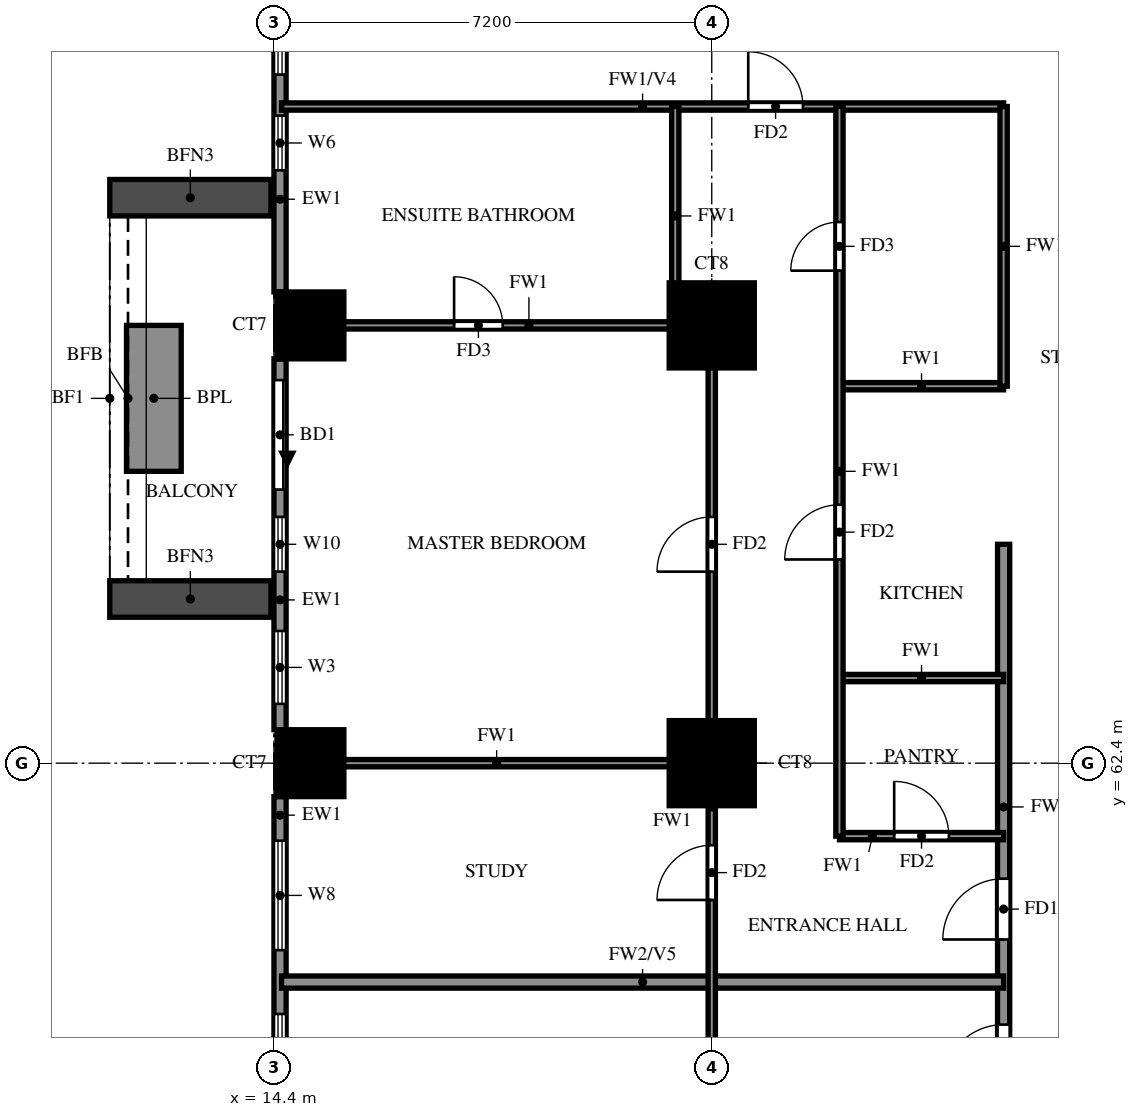
"""IFC4 building model, lengths in metres.
Left out: names, types, materials, properties, quantities, classifications, styles, units other than length and angle.
Written with IfcOpenShell. Run it as: python <this file> out.ifc"""

import sys

from ifc_helpers import new_model, si_unit, direction, frame, frame_2d, origin, origin_2d, place, context, subcontext, project, spatial, rectangle, extrude, source, transform, mapped, element, fill, save


model = new_model("IFC4")
c1 = context("Model", 3, precision=1e-05, world=origin(), true_north=direction((0.0, 1.0)))
c2 = subcontext(c1, "Body", "Model", "MODEL_VIEW")
j1 = project(units=[si_unit("LENGTHUNIT", "METRE"), si_unit("PLANEANGLEUNIT", "RADIAN")], contexts=[c1])
p1 = place(None, origin())
s1 = spatial("IfcSite", under=j1, at=p1, CompositionType="ELEMENT")
p2 = place(p1, origin())
s2 = spatial("IfcBuilding", under=s1, at=p2, CompositionType="ELEMENT")
p3 = place(p2, frame((0.0, 0.0, 55.0)))
s3 = spatial("IfcBuildingStorey", under=s2, at=p3, CompositionType="ELEMENT", Elevation=55.0)
m1 = source(origin(), c2, "Body", "SweptSolid", [
    extrude(rectangle(XDim=1.1, YDim=1.1, at=origin_2d()), origin(), (0.0, 0.0, 1.0), 3.18),
])
p4 = place(p3, frame((15.0, 62.4, 0.0), z_axis=(0.0, 0.0, 1.0), x_axis=(1.0, 0.0, 0.0)))
e1 = element("IfcColumn", 1, at=p4, inside=s3, PredefinedType="COLUMN", context=c2, shape_type="MappedRepresentation", body=[
    mapped(m1, transform((0.0, 0.0, 0.0))),
])
m2 = source(origin(), c2, "Body", "SweptSolid", [
    extrude(rectangle(XDim=1.4, YDim=1.4, at=origin_2d()), origin(), (0.0, 0.0, 1.0), 3.18),
])
p5 = place(p3, frame((21.6, 62.4, 0.0), z_axis=(0.0, 0.0, 1.0), x_axis=(1.0, 0.0, 0.0)))
e2 = element("IfcColumn", 2, at=p5, inside=s3, PredefinedType="COLUMN", context=c2, shape_type="MappedRepresentation", body=[
    mapped(m2, transform((0.0, 0.0, 0.0))),
])
p6 = place(p3, frame((15.0, 69.6, 0.0), z_axis=(0.0, 0.0, 1.0), x_axis=(1.0, 0.0, 0.0)))
e3 = element("IfcColumn", 3, at=p6, inside=s3, PredefinedType="COLUMN", context=c2, shape_type="MappedRepresentation", body=[
    mapped(m1, transform((0.0, 0.0, 0.0))),
])
p7 = place(p3, frame((21.6, 69.6, 0.0), z_axis=(0.0, 0.0, 1.0), x_axis=(1.0, 0.0, 0.0)))
e4 = element("IfcColumn", 4, at=p7, inside=s3, PredefinedType="COLUMN", context=c2, shape_type="MappedRepresentation", body=[
    mapped(m2, transform((0.0, 0.0, 0.0))),
])
p8 = place(p3, frame((14.5, 76.25, 0.0), z_axis=(0.0, 0.0, 1.0), x_axis=(0.0, -1.0, 0.0)))
e5 = element("IfcWall", 5, at=p8, inside=s3, PredefinedType="SOLIDWALL", context=c2, shape_type="SweptSolid", body=[
    extrude(rectangle(XDim=6.1, YDim=0.2, at=frame_2d((3.05, 0.0))), origin(), (0.0, 0.0, 1.0), 3.18),
])
p9 = place(p8, frame((3.2, 0.0, 1.5)))
e6 = element("IfcOpeningElement", 6, at=p9, cuts=e5, PredefinedType="OPENING", context=c2, shape_type="SweptSolid", body=[
    extrude(rectangle(XDim=0.9, YDim=0.9, at=frame_2d((0.45, 0.45))), frame((0.0, 0.11, 0.0), z_axis=(0.0, -1.0, 0.0), x_axis=(1.0, 0.0, 0.0)), (0.0, 0.0, 1.0), 0.22),
])
p10 = place(p8, frame((0.725, 0.0, 0.6)))
e7 = element("IfcOpeningElement", 7, at=p10, cuts=e5, PredefinedType="OPENING", context=c2, shape_type="SweptSolid", body=[
    extrude(rectangle(XDim=1.8, YDim=2.4, at=frame_2d((0.9, 1.2))), frame((0.0, 0.11, 0.0), z_axis=(0.0, -1.0, 0.0), x_axis=(1.0, 0.0, 0.0)), (0.0, 0.0, 1.0), 0.22),
])
p11 = place(p3, frame((14.5, 69.05, 0.0), z_axis=(0.0, 0.0, 1.0), x_axis=(0.0, -1.0, 0.0)))
e8 = element("IfcWall", 8, at=p11, inside=s3, PredefinedType="SOLIDWALL", context=c2, shape_type="SweptSolid", body=[
    extrude(rectangle(XDim=6.1, YDim=0.2, at=frame_2d((3.05, 0.0))), origin(), (0.0, 0.0, 1.0), 3.18),
])
p12 = place(p11, frame((0.35, 0.0, 0.0)))
e9 = element("IfcOpeningElement", 9, at=p12, cuts=e8, PredefinedType="OPENING", context=c2, shape_type="SweptSolid", body=[
    extrude(rectangle(XDim=1.8, YDim=2.4, at=frame_2d((0.9, 1.2))), frame((0.0, 0.11, 0.0), z_axis=(0.0, -1.0, 0.0), x_axis=(1.0, 0.0, 0.0)), (0.0, 0.0, 1.0), 0.22),
])
p13 = place(p11, frame((2.6, 0.0, 0.6)))
e10 = element("IfcOpeningElement", 10, at=p13, cuts=e8, PredefinedType="OPENING", context=c2, shape_type="SweptSolid", body=[
    extrude(rectangle(XDim=0.9, YDim=2.4, at=frame_2d((0.45, 1.2))), frame((0.0, 0.11, 0.0), z_axis=(0.0, -1.0, 0.0), x_axis=(1.0, 0.0, 0.0)), (0.0, 0.0, 1.0), 0.22),
])
p14 = place(p11, frame((4.475, 0.0, 0.6)))
e11 = element("IfcOpeningElement", 11, at=p14, cuts=e8, PredefinedType="OPENING", context=c2, shape_type="SweptSolid", body=[
    extrude(rectangle(XDim=1.2, YDim=2.4, at=frame_2d((0.6, 1.2))), frame((0.0, 0.11, 0.0), z_axis=(0.0, -1.0, 0.0), x_axis=(1.0, 0.0, 0.0)), (0.0, 0.0, 1.0), 0.22),
])
p15 = place(p3, frame((14.5, 61.85, 0.0), z_axis=(0.0, 0.0, 1.0), x_axis=(0.0, -1.0, 0.0)))
e12 = element("IfcWall", 12, at=p15, inside=s3, PredefinedType="SOLIDWALL", context=c2, shape_type="SweptSolid", body=[
    extrude(rectangle(XDim=6.1, YDim=0.2, at=frame_2d((3.05, 0.0))), origin(), (0.0, 0.0, 1.0), 3.18),
])
p16 = place(p15, frame((3.575, 0.0, 0.6)))
e13 = element("IfcOpeningElement", 13, at=p16, cuts=e12, PredefinedType="OPENING", context=c2, shape_type="SweptSolid", body=[
    extrude(rectangle(XDim=1.8, YDim=2.4, at=frame_2d((0.9, 1.2))), frame((0.0, 0.11, 0.0), z_axis=(0.0, -1.0, 0.0), x_axis=(1.0, 0.0, 0.0)), (0.0, 0.0, 1.0), 0.22),
])
p17 = place(p15, frame((0.725, 0.0, 0.6)))
e14 = element("IfcOpeningElement", 14, at=p17, cuts=e12, PredefinedType="OPENING", context=c2, shape_type="SweptSolid", body=[
    extrude(rectangle(XDim=1.8, YDim=2.4, at=frame_2d((0.9, 1.2))), frame((0.0, 0.11, 0.0), z_axis=(0.0, -1.0, 0.0), x_axis=(1.0, 0.0, 0.0)), (0.0, 0.0, 1.0), 0.22),
])
for number, where, z_axis, x_axis in (
    (15, (14.35, 71.7, 0.0), (0.0, 0.0, 1.0), (-1.0, 0.0, 0.0)),
    (16, (14.35, 65.1, 0.0), (0.0, 0.0, 1.0), (-1.0, 0.0, 0.0)),
):
    element("IfcWall", number, at=place(p3, frame(where, z_axis=z_axis, x_axis=x_axis)), inside=s3, PredefinedType="SOLIDWALL", context=c2, shape_type="SweptSolid", body=[
        extrude(rectangle(XDim=2.65, YDim=0.6, at=frame_2d((1.325, 0.0))), origin(), (0.0, 0.0, 1.0), 2.85),
    ])
p18 = place(p3, frame((12.425, 69.6, 0.0), z_axis=(0.0, 0.0, 1.0), x_axis=(0.0, -1.0, 0.0)))
e17 = element("IfcWall", 17, at=p18, inside=s3, PredefinedType="SOLIDWALL", context=c2, shape_type="SweptSolid", body=[
    extrude(rectangle(XDim=2.4, YDim=0.9, at=frame_2d((1.2, 0.0))), origin(), (0.0, 0.0, 1.0), 0.9),
])
p19 = place(p3, frame((26.4, 56.4, 0.0), z_axis=(0.0, 0.0, 1.0), x_axis=(0.0, 1.0, 0.0)))
e18 = element("IfcWall", 18, at=p19, inside=s3, PredefinedType="SOLIDWALL", context=c2, shape_type="SweptSolid", body=[
    extrude(rectangle(XDim=9.6, YDim=0.2, at=frame_2d((4.8, 0.0))), origin(), (0.0, 0.0, 1.0), 3.18),
])
p20 = place(p19, frame((0.7, 0.0, 0.0)))
e19 = element("IfcOpeningElement", 19, at=p20, cuts=e18, PredefinedType="OPENING", context=c2, shape_type="SweptSolid", body=[
    extrude(rectangle(XDim=1.0, YDim=2.1, at=frame_2d((0.5, 1.05))), frame((0.0, 0.11, 0.0), z_axis=(0.0, -1.0, 0.0), x_axis=(1.0, 0.0, 0.0)), (0.0, 0.0, 1.0), 0.22),
])
p21 = place(p19, frame((3.1, 0.0, 0.0)))
e20 = element("IfcOpeningElement", 20, at=p21, cuts=e18, PredefinedType="OPENING", context=c2, shape_type="SweptSolid", body=[
    extrude(rectangle(XDim=1.0, YDim=2.1, at=frame_2d((0.5, 1.05))), frame((0.0, 0.11, 0.0), z_axis=(0.0, -1.0, 0.0), x_axis=(1.0, 0.0, 0.0)), (0.0, 0.0, 1.0), 0.22),
])
p22 = place(p3, frame((14.525, 58.8, 0.0), z_axis=(0.0, 0.0, 1.0), x_axis=(1.0, 0.0, 0.0)))
e21 = element("IfcWall", 21, at=p22, inside=s3, PredefinedType="SOLIDWALL", context=c2, shape_type="SweptSolid", body=[
    extrude(rectangle(XDim=11.875, YDim=0.2, at=frame_2d((5.938, 0.0))), origin(), (0.0, 0.0, 1.0), 2.28),
])
p23 = place(p3, frame((23.7, 61.2, 0.0), z_axis=(0.0, 0.0, 1.0), x_axis=(1.0, 0.0, 0.0)))
e22 = element("IfcWall", 22, at=p23, inside=s3, PredefinedType="PARTITIONING", context=c2, shape_type="SweptSolid", body=[
    extrude(rectangle(XDim=2.7, YDim=0.12, at=frame_2d((1.35, 0.0))), origin(), (0.0, 0.0, 1.0), 3.18),
])
p24 = place(p23, frame((0.9, 0.0, 0.0)))
e23 = element("IfcOpeningElement", 23, at=p24, cuts=e22, PredefinedType="OPENING", context=c2, shape_type="SweptSolid", body=[
    extrude(rectangle(XDim=0.9, YDim=2.1, at=frame_2d((0.45, 1.05))), frame((0.0, 0.07, 0.0), z_axis=(0.0, -1.0, 0.0), x_axis=(1.0, 0.0, 0.0)), (0.0, 0.0, 1.0), 0.14),
])
p25 = place(p3, frame((14.525, 62.4, 0.0), z_axis=(0.0, 0.0, 1.0), x_axis=(1.0, 0.0, 0.0)))
e24 = element("IfcWall", 24, at=p25, inside=s3, PredefinedType="PARTITIONING", context=c2, shape_type="SweptSolid", body=[
    extrude(rectangle(XDim=7.075, YDim=0.12, at=frame_2d((3.538, 0.0))), origin(), (0.0, 0.0, 1.0), 3.18),
])
for number, where, z_axis, x_axis in (
    (25, (23.7, 63.8, 0.0), (0.0, 0.0, 1.0), (1.0, 0.0, 0.0)),
    (26, (23.7, 68.6, 0.0), (0.0, 0.0, 1.0), (1.0, 0.0, 0.0)),
):
    element("IfcWall", number, at=place(p3, frame(where, z_axis=z_axis, x_axis=x_axis)), inside=s3, PredefinedType="PARTITIONING", context=c2, shape_type="SweptSolid", body=[
        extrude(rectangle(XDim=2.7, YDim=0.12, at=frame_2d((1.35, 0.0))), origin(), (0.0, 0.0, 1.0), 3.18),
    ])
p26 = place(p3, frame((14.525, 69.6, 0.0), z_axis=(0.0, 0.0, 1.0), x_axis=(1.0, 0.0, 0.0)))
e27 = element("IfcWall", 27, at=p26, inside=s3, PredefinedType="PARTITIONING", context=c2, shape_type="SweptSolid", body=[
    extrude(rectangle(XDim=7.075, YDim=0.12, at=frame_2d((3.538, 0.0))), origin(), (0.0, 0.0, 1.0), 3.18),
])
p27 = place(p26, frame((2.837, 0.0, 0.0)))
e28 = element("IfcOpeningElement", 28, at=p27, cuts=e27, PredefinedType="OPENING", context=c2, shape_type="SweptSolid", body=[
    extrude(rectangle(XDim=0.8, YDim=2.1, at=frame_2d((0.4, 1.05))), frame((0.0, 0.07, 0.0), z_axis=(0.0, -1.0, 0.0), x_axis=(1.0, 0.0, 0.0)), (0.0, 0.0, 1.0), 0.14),
])
p28 = place(p3, frame((14.525, 73.2, 0.0), z_axis=(0.0, 0.0, 1.0), x_axis=(1.0, 0.0, 0.0)))
e29 = element("IfcWall", 29, at=p28, inside=s3, PredefinedType="PARTITIONING", context=c2, shape_type="SweptSolid", body=[
    extrude(rectangle(XDim=11.875, YDim=0.12, at=frame_2d((5.938, 0.0))), origin(), (0.0, 0.0, 1.0), 2.28),
])
p29 = place(p28, frame((7.675, 0.0, 0.0)))
e30 = element("IfcOpeningElement", 30, at=p29, cuts=e29, PredefinedType="OPENING", context=c2, shape_type="SweptSolid", body=[
    extrude(rectangle(XDim=0.9, YDim=2.1, at=frame_2d((0.45, 1.05))), frame((0.0, 0.07, 0.0), z_axis=(0.0, -1.0, 0.0), x_axis=(1.0, 0.0, 0.0)), (0.0, 0.0, 1.0), 0.14),
])
p30 = place(p3, frame((21.0, 69.6, 0.0), z_axis=(0.0, 0.0, 1.0), x_axis=(0.0, 1.0, 0.0)))
e31 = element("IfcWall", 31, at=p30, inside=s3, PredefinedType="PARTITIONING", context=c2, shape_type="SweptSolid", body=[
    extrude(rectangle(XDim=3.6, YDim=0.12, at=frame_2d((1.8, 0.0))), origin(), (0.0, 0.0, 1.0), 3.18),
])
p31 = place(p3, frame((21.6, 55.2, 0.0), z_axis=(0.0, 0.0, 1.0), x_axis=(0.0, 1.0, 0.0)))
e32 = element("IfcWall", 32, at=p31, inside=s3, PredefinedType="PARTITIONING", context=c2, shape_type="SweptSolid", body=[
    extrude(rectangle(XDim=14.4, YDim=0.12, at=frame_2d((7.2, 0.0))), origin(), (0.0, 0.0, 1.0), 3.18),
])
p32 = place(p31, frame((1.05, 0.0, 0.0)))
e33 = element("IfcOpeningElement", 33, at=p32, cuts=e32, PredefinedType="OPENING", context=c2, shape_type="SweptSolid", body=[
    extrude(rectangle(XDim=1.5, YDim=2.1, at=frame_2d((0.75, 1.05))), frame((0.0, 0.07, 0.0), z_axis=(0.0, -1.0, 0.0), x_axis=(1.0, 0.0, 0.0)), (0.0, 0.0, 1.0), 0.14),
])
p33 = place(p31, frame((4.95, 0.0, 0.0)))
e34 = element("IfcOpeningElement", 34, at=p33, cuts=e32, PredefinedType="OPENING", context=c2, shape_type="SweptSolid", body=[
    extrude(rectangle(XDim=0.9, YDim=2.1, at=frame_2d((0.45, 1.05))), frame((0.0, 0.07, 0.0), z_axis=(0.0, -1.0, 0.0), x_axis=(1.0, 0.0, 0.0)), (0.0, 0.0, 1.0), 0.14),
])
p34 = place(p31, frame((10.35, 0.0, 0.0)))
e35 = element("IfcOpeningElement", 35, at=p34, cuts=e32, PredefinedType="OPENING", context=c2, shape_type="SweptSolid", body=[
    extrude(rectangle(XDim=0.9, YDim=2.1, at=frame_2d((0.45, 1.05))), frame((0.0, 0.07, 0.0), z_axis=(0.0, -1.0, 0.0), x_axis=(1.0, 0.0, 0.0)), (0.0, 0.0, 1.0), 0.14),
])
p35 = place(p3, frame((23.7, 61.2, 0.0), z_axis=(0.0, 0.0, 1.0), x_axis=(0.0, 1.0, 0.0)))
e36 = element("IfcWall", 36, at=p35, inside=s3, PredefinedType="PARTITIONING", context=c2, shape_type="SweptSolid", body=[
    extrude(rectangle(XDim=12.0, YDim=0.12, at=frame_2d((6.0, 0.0))), origin(), (0.0, 0.0, 1.0), 3.18),
])
p36 = place(p35, frame((4.55, 0.0, 0.0)))
e37 = element("IfcOpeningElement", 37, at=p36, cuts=e36, PredefinedType="OPENING", context=c2, shape_type="SweptSolid", body=[
    extrude(rectangle(XDim=0.9, YDim=2.1, at=frame_2d((0.45, 1.05))), frame((0.0, 0.07, 0.0), z_axis=(0.0, -1.0, 0.0), x_axis=(1.0, 0.0, 0.0)), (0.0, 0.0, 1.0), 0.14),
])
p37 = place(p35, frame((9.3, 0.0, 0.0)))
e38 = element("IfcOpeningElement", 38, at=p37, cuts=e36, PredefinedType="OPENING", context=c2, shape_type="SweptSolid", body=[
    extrude(rectangle(XDim=0.8, YDim=2.1, at=frame_2d((0.4, 1.05))), frame((0.0, 0.07, 0.0), z_axis=(0.0, -1.0, 0.0), x_axis=(1.0, 0.0, 0.0)), (0.0, 0.0, 1.0), 0.14),
])
p38 = place(p3, frame((26.4, 68.6, 0.0), z_axis=(0.0, 0.0, 1.0), x_axis=(0.0, 1.0, 0.0)))
e39 = element("IfcWall", 39, at=p38, inside=s3, PredefinedType="PARTITIONING", context=c2, shape_type="SweptSolid", body=[
    extrude(rectangle(XDim=4.6, YDim=0.12, at=frame_2d((2.3, 0.0))), origin(), (0.0, 0.0, 1.0), 3.18),
])
p39 = place(p9, origin())
e40 = element("IfcWindow", 40, at=p39, inside=s3, PartitioningType="SINGLE_PANEL", PredefinedType="WINDOW", context=c2, shape_type="SweptSolid", body=[
    extrude(rectangle(XDim=0.9, YDim=0.9, at=frame_2d((0.45, 0.45))), frame((0.0, 0.03, 0.0), z_axis=(0.0, -1.0, 0.0), x_axis=(1.0, 0.0, 0.0)), (0.0, 0.0, 1.0), 0.06),
])
fill(e6, e40)
p40 = place(p10, origin())
e41 = element("IfcWindow", 41, at=p40, inside=s3, PartitioningType="DOUBLE_PANEL_VERTICAL", PredefinedType="WINDOW", context=c2, shape_type="SweptSolid", body=[
    extrude(rectangle(XDim=1.8, YDim=2.4, at=frame_2d((0.9, 1.2))), frame((0.0, 0.03, 0.0), z_axis=(0.0, -1.0, 0.0), x_axis=(1.0, 0.0, 0.0)), (0.0, 0.0, 1.0), 0.06),
])
fill(e7, e41)
p41 = place(p12, origin())
e42 = element("IfcDoor", 42, at=p41, inside=s3, OperationType="DOUBLE_DOOR_SLIDING", PredefinedType="DOOR", context=c2, shape_type="SweptSolid", body=[
    extrude(rectangle(XDim=1.8, YDim=2.4, at=frame_2d((0.9, 1.2))), frame((0.0, 0.025, 0.0), z_axis=(0.0, -1.0, 0.0), x_axis=(1.0, 0.0, 0.0)), (0.0, 0.0, 1.0), 0.05),
])
fill(e9, e42)
p42 = place(p13, origin())
e43 = element("IfcWindow", 43, at=p42, inside=s3, PartitioningType="SINGLE_PANEL", PredefinedType="WINDOW", context=c2, shape_type="SweptSolid", body=[
    extrude(rectangle(XDim=0.9, YDim=2.4, at=frame_2d((0.45, 1.2))), frame((0.0, 0.03, 0.0), z_axis=(0.0, -1.0, 0.0), x_axis=(1.0, 0.0, 0.0)), (0.0, 0.0, 1.0), 0.06),
])
fill(e10, e43)
p43 = place(p14, origin())
e44 = element("IfcWindow", 44, at=p43, inside=s3, PartitioningType="SINGLE_PANEL", PredefinedType="WINDOW", context=c2, shape_type="SweptSolid", body=[
    extrude(rectangle(XDim=1.2, YDim=2.4, at=frame_2d((0.6, 1.2))), frame((0.0, 0.03, 0.0), z_axis=(0.0, -1.0, 0.0), x_axis=(1.0, 0.0, 0.0)), (0.0, 0.0, 1.0), 0.06),
])
fill(e11, e44)
p44 = place(p16, origin())
e45 = element("IfcWindow", 45, at=p44, inside=s3, PartitioningType="DOUBLE_PANEL_VERTICAL", PredefinedType="WINDOW", context=c2, shape_type="SweptSolid", body=[
    extrude(rectangle(XDim=1.8, YDim=2.4, at=frame_2d((0.9, 1.2))), frame((0.0, 0.03, 0.0), z_axis=(0.0, -1.0, 0.0), x_axis=(1.0, 0.0, 0.0)), (0.0, 0.0, 1.0), 0.06),
])
fill(e13, e45)
p45 = place(p17, origin())
e46 = element("IfcWindow", 46, at=p45, inside=s3, PartitioningType="DOUBLE_PANEL_VERTICAL", PredefinedType="WINDOW", context=c2, shape_type="SweptSolid", body=[
    extrude(rectangle(XDim=1.8, YDim=2.4, at=frame_2d((0.9, 1.2))), frame((0.0, 0.03, 0.0), z_axis=(0.0, -1.0, 0.0), x_axis=(1.0, 0.0, 0.0)), (0.0, 0.0, 1.0), 0.06),
])
fill(e14, e46)
p46 = place(p20, origin())
e47 = element("IfcDoor", 47, at=p46, inside=s3, OperationType="SINGLE_SWING_LEFT", PredefinedType="DOOR", context=c2, shape_type="SweptSolid", body=[
    extrude(rectangle(XDim=1.0, YDim=2.1, at=frame_2d((0.5, 1.05))), frame((0.0, 0.025, 0.0), z_axis=(0.0, -1.0, 0.0), x_axis=(1.0, 0.0, 0.0)), (0.0, 0.0, 1.0), 0.05),
])
fill(e19, e47)
p47 = place(p21, origin())
e48 = element("IfcDoor", 48, at=p47, inside=s3, OperationType="SINGLE_SWING_LEFT", PredefinedType="DOOR", context=c2, shape_type="SweptSolid", body=[
    extrude(rectangle(XDim=1.0, YDim=2.1, at=frame_2d((0.5, 1.05))), frame((0.0, 0.025, 0.0), z_axis=(0.0, -1.0, 0.0), x_axis=(1.0, 0.0, 0.0)), (0.0, 0.0, 1.0), 0.05),
])
fill(e20, e48)
p48 = place(p33, origin())
e49 = element("IfcDoor", 49, at=p48, inside=s3, OperationType="SINGLE_SWING_LEFT", PredefinedType="DOOR", context=c2, shape_type="SweptSolid", body=[
    extrude(rectangle(XDim=0.9, YDim=2.1, at=frame_2d((0.45, 1.05))), frame((0.0, 0.025, 0.0), z_axis=(0.0, -1.0, 0.0), x_axis=(1.0, 0.0, 0.0)), (0.0, 0.0, 1.0), 0.05),
])
fill(e34, e49)
p49 = place(p34, origin())
e50 = element("IfcDoor", 50, at=p49, inside=s3, OperationType="SINGLE_SWING_RIGHT", PredefinedType="DOOR", context=c2, shape_type="SweptSolid", body=[
    extrude(rectangle(XDim=0.9, YDim=2.1, at=frame_2d((0.45, 1.05))), frame((0.0, 0.025, 0.0), z_axis=(0.0, -1.0, 0.0), x_axis=(1.0, 0.0, 0.0)), (0.0, 0.0, 1.0), 0.05),
])
fill(e35, e50)
p50 = place(p27, origin())
e51 = element("IfcDoor", 51, at=p50, inside=s3, OperationType="SINGLE_SWING_LEFT", PredefinedType="DOOR", context=c2, shape_type="SweptSolid", body=[
    extrude(rectangle(XDim=0.8, YDim=2.1, at=frame_2d((0.4, 1.05))), frame((0.0, 0.025, 0.0), z_axis=(0.0, -1.0, 0.0), x_axis=(1.0, 0.0, 0.0)), (0.0, 0.0, 1.0), 0.05),
])
fill(e28, e51)
p51 = place(p29, origin())
e52 = element("IfcDoor", 52, at=p51, inside=s3, OperationType="SINGLE_SWING_LEFT", PredefinedType="DOOR", context=c2, shape_type="SweptSolid", body=[
    extrude(rectangle(XDim=0.9, YDim=2.1, at=frame_2d((0.45, 1.05))), frame((0.0, 0.025, 0.0), z_axis=(0.0, -1.0, 0.0), x_axis=(1.0, 0.0, 0.0)), (0.0, 0.0, 1.0), 0.05),
])
fill(e30, e52)
p52 = place(p24, origin())
e53 = element("IfcDoor", 53, at=p52, inside=s3, OperationType="SINGLE_SWING_RIGHT", PredefinedType="DOOR", context=c2, shape_type="SweptSolid", body=[
    extrude(rectangle(XDim=0.9, YDim=2.1, at=frame_2d((0.45, 1.05))), frame((0.0, 0.025, 0.0), z_axis=(0.0, -1.0, 0.0), x_axis=(1.0, 0.0, 0.0)), (0.0, 0.0, 1.0), 0.05),
])
fill(e23, e53)
p53 = place(p36, origin())
e54 = element("IfcDoor", 54, at=p53, inside=s3, OperationType="SINGLE_SWING_LEFT", PredefinedType="DOOR", context=c2, shape_type="SweptSolid", body=[
    extrude(rectangle(XDim=0.9, YDim=2.1, at=frame_2d((0.45, 1.05))), frame((0.0, 0.025, 0.0), z_axis=(0.0, -1.0, 0.0), x_axis=(1.0, 0.0, 0.0)), (0.0, 0.0, 1.0), 0.05),
])
fill(e37, e54)
p54 = place(p37, origin())
e55 = element("IfcDoor", 55, at=p54, inside=s3, OperationType="SINGLE_SWING_LEFT", PredefinedType="DOOR", context=c2, shape_type="SweptSolid", body=[
    extrude(rectangle(XDim=0.8, YDim=2.1, at=frame_2d((0.4, 1.05))), frame((0.0, 0.025, 0.0), z_axis=(0.0, -1.0, 0.0), x_axis=(1.0, 0.0, 0.0)), (0.0, 0.0, 1.0), 0.05),
])
fill(e38, e55)
save(model, sys.argv[1])
